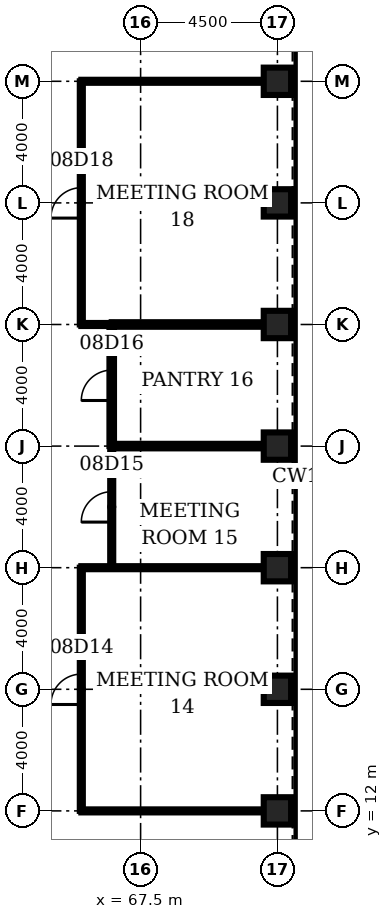
"""IFC4 building model, lengths in metres.
Left out: names, types, materials, properties, quantities, classifications, styles, units other than length and angle.
Written with IfcOpenShell. Run it as: python <this file> out.ifc"""

import sys

from ifc_helpers import new_model, si_unit, direction, frame, frame_2d, origin, origin_2d, place, context, subcontext, project, spatial, rectangle, hollow_rectangle, extrude, element, fill, save


model = new_model("IFC4")
c1 = context("Model", 3, precision=1e-05, world=origin(), true_north=direction((0.0, 1.0)))
c2 = subcontext(c1, "Body", "Model", "MODEL_VIEW")
j1 = project(units=[si_unit("LENGTHUNIT", "METRE"), si_unit("PLANEANGLEUNIT", "RADIAN")], contexts=[c1])
p1 = place(None, origin())
s1 = spatial("IfcSite", under=j1, at=p1, CompositionType="ELEMENT")
p2 = place(p1, origin())
s2 = spatial("IfcBuilding", under=s1, at=p2, CompositionType="ELEMENT")
p3 = place(p2, frame((0.0, 0.0, 41.0)))
s3 = spatial("IfcBuildingStorey", under=s2, at=p3, CompositionType="ELEMENT", Elevation=41.0)
for number, where, z_axis, x_axis in (
    (1, (72.0, 12.0, 0.0), (0.0, 0.0, 1.0), (1.0, 0.0, 0.0)),
    (2, (72.0, 16.0, 0.0), (0.0, 0.0, 1.0), (1.0, 0.0, 0.0)),
    (3, (72.0, 20.0, 0.0), (0.0, 0.0, 1.0), (1.0, 0.0, 0.0)),
    (4, (72.0, 24.0, 0.0), (0.0, 0.0, 1.0), (1.0, 0.0, 0.0)),
    (5, (72.0, 28.0, 0.0), (0.0, 0.0, 1.0), (1.0, 0.0, 0.0)),
    (6, (72.0, 32.0, 0.0), (0.0, 0.0, 1.0), (1.0, 0.0, 0.0)),
    (7, (72.0, 36.0, 0.0), (0.0, 0.0, 1.0), (1.0, 0.0, 0.0)),
):
    element("IfcColumn", number, at=place(p3, frame(where, z_axis=z_axis, x_axis=x_axis)), inside=s3, PredefinedType="COLUMN", context=c2, shape_type="SweptSolid", body=[
        extrude(hollow_rectangle(XDim=0.9, YDim=0.9, WallThickness=0.12, at=origin_2d()), origin(), (0.0, 0.0, 1.0), 4.5),
    ])
for number, where, z_axis, x_axis in (
    (8, (65.55, 12.0, 0.0), (0.0, 0.0, 1.0), (1.0, 0.0, 0.0)),
    (9, (65.55, 20.0, 0.0), (0.0, 0.0, 1.0), (1.0, 0.0, 0.0)),
):
    element("IfcWall", number, at=place(p3, frame(where, z_axis=z_axis, x_axis=x_axis)), inside=s3, PredefinedType="PARTITIONING", context=c2, shape_type="SweptSolid", body=[
        extrude(rectangle(XDim=6.0, YDim=0.1, at=frame_2d((3.0, 0.0))), origin(), (0.0, 0.0, 1.0), 3.0),
    ])
p4 = place(p3, frame((66.55, 24.0, 0.0), z_axis=(0.0, 0.0, 1.0), x_axis=(1.0, 0.0, 0.0)))
e10 = element("IfcWall", 10, at=p4, inside=s3, PredefinedType="PARTITIONING", context=c2, shape_type="SweptSolid", body=[
    extrude(rectangle(XDim=5.0, YDim=0.15, at=frame_2d((2.5, 0.0))), origin(), (0.0, 0.0, 1.0), 3.0),
])
p5 = place(p3, frame((65.55, 28.0, 0.0), z_axis=(0.0, 0.0, 1.0), x_axis=(1.0, 0.0, 0.0)))
e11 = element("IfcWall", 11, at=p5, inside=s3, PredefinedType="PARTITIONING", context=c2, shape_type="SweptSolid", body=[
    extrude(rectangle(XDim=1.0, YDim=0.1, at=frame_2d((0.5, 0.0))), origin(), (0.0, 0.0, 1.0), 3.0),
])
p6 = place(p3, frame((66.55, 28.0, 0.0), z_axis=(0.0, 0.0, 1.0), x_axis=(1.0, 0.0, 0.0)))
e12 = element("IfcWall", 12, at=p6, inside=s3, PredefinedType="PARTITIONING", context=c2, shape_type="SweptSolid", body=[
    extrude(rectangle(XDim=5.0, YDim=0.15, at=frame_2d((2.5, 0.0))), origin(), (0.0, 0.0, 1.0), 3.0),
])
p7 = place(p3, frame((65.55, 36.0, 0.0), z_axis=(0.0, 0.0, 1.0), x_axis=(1.0, 0.0, 0.0)))
e13 = element("IfcWall", 13, at=p7, inside=s3, PredefinedType="PARTITIONING", context=c2, shape_type="SweptSolid", body=[
    extrude(rectangle(XDim=6.0, YDim=0.1, at=frame_2d((3.0, 0.0))), origin(), (0.0, 0.0, 1.0), 3.0),
])
p8 = place(p3, frame((65.55, 12.0, 0.0), z_axis=(0.0, 0.0, 1.0), x_axis=(0.0, 1.0, 0.0)))
e14 = element("IfcWall", 14, at=p8, inside=s3, PredefinedType="PARTITIONING", context=c2, shape_type="SweptSolid", body=[
    extrude(rectangle(XDim=8.0, YDim=0.1, at=frame_2d((4.0, 0.0))), origin(), (0.0, 0.0, 1.0), 3.0),
])
p9 = place(p8, frame((3.5, 0.0, 0.0)))
e15 = element("IfcOpeningElement", 15, at=p9, cuts=e14, PredefinedType="OPENING", context=c2, shape_type="SweptSolid", body=[
    extrude(rectangle(XDim=1.0, YDim=2.1, at=frame_2d((0.5, 1.05))), frame((0.0, 0.06, 0.0), z_axis=(0.0, -1.0, 0.0), x_axis=(1.0, 0.0, 0.0)), (0.0, 0.0, 1.0), 0.12),
])
p10 = place(p3, frame((65.55, 28.0, 0.0), z_axis=(0.0, 0.0, 1.0), x_axis=(0.0, 1.0, 0.0)))
e16 = element("IfcWall", 16, at=p10, inside=s3, PredefinedType="PARTITIONING", context=c2, shape_type="SweptSolid", body=[
    extrude(rectangle(XDim=8.0, YDim=0.1, at=frame_2d((4.0, 0.0))), origin(), (0.0, 0.0, 1.0), 3.0),
])
p11 = place(p10, frame((3.5, 0.0, 0.0)))
e17 = element("IfcOpeningElement", 17, at=p11, cuts=e16, PredefinedType="OPENING", context=c2, shape_type="SweptSolid", body=[
    extrude(rectangle(XDim=1.0, YDim=2.1, at=frame_2d((0.5, 1.05))), frame((0.0, 0.06, 0.0), z_axis=(0.0, -1.0, 0.0), x_axis=(1.0, 0.0, 0.0)), (0.0, 0.0, 1.0), 0.12),
])
p12 = place(p3, frame((66.55, 20.0, 0.0), z_axis=(0.0, 0.0, 1.0), x_axis=(0.0, 1.0, 0.0)))
e18 = element("IfcWall", 18, at=p12, inside=s3, PredefinedType="PARTITIONING", context=c2, shape_type="SweptSolid", body=[
    extrude(rectangle(XDim=4.0, YDim=0.1, at=frame_2d((2.0, 0.0))), origin(), (0.0, 0.0, 1.0), 3.0),
])
p13 = place(p12, frame((1.5, 0.0, 0.0)))
e19 = element("IfcOpeningElement", 19, at=p13, cuts=e18, PredefinedType="OPENING", context=c2, shape_type="SweptSolid", body=[
    extrude(rectangle(XDim=1.0, YDim=2.1, at=frame_2d((0.5, 1.05))), frame((0.0, 0.06, 0.0), z_axis=(0.0, -1.0, 0.0), x_axis=(1.0, 0.0, 0.0)), (0.0, 0.0, 1.0), 0.12),
])
p14 = place(p3, frame((66.55, 24.0, 0.0), z_axis=(0.0, 0.0, 1.0), x_axis=(0.0, 1.0, 0.0)))
e20 = element("IfcWall", 20, at=p14, inside=s3, PredefinedType="PARTITIONING", context=c2, shape_type="SweptSolid", body=[
    extrude(rectangle(XDim=4.0, YDim=0.15, at=frame_2d((2.0, 0.0))), origin(), (0.0, 0.0, 1.0), 3.0),
])
p15 = place(p14, frame((1.5, 0.0, 0.0)))
e21 = element("IfcOpeningElement", 21, at=p15, cuts=e20, PredefinedType="OPENING", context=c2, shape_type="SweptSolid", body=[
    extrude(rectangle(XDim=1.0, YDim=2.1, at=frame_2d((0.5, 1.05))), frame((0.0, 0.085, 0.0), z_axis=(0.0, -1.0, 0.0), x_axis=(1.0, 0.0, 0.0)), (0.0, 0.0, 1.0), 0.17),
])
p16 = place(p9, origin())
e22 = element("IfcDoor", 22, at=p16, inside=s3, OperationType="SINGLE_SWING_LEFT", PredefinedType="DOOR", context=c2, shape_type="SweptSolid", body=[
    extrude(rectangle(XDim=1.0, YDim=2.1, at=frame_2d((0.5, 1.05))), frame((0.0, 0.025, 0.0), z_axis=(0.0, -1.0, 0.0), x_axis=(1.0, 0.0, 0.0)), (0.0, 0.0, 1.0), 0.05),
])
fill(e15, e22)
p17 = place(p13, origin())
e23 = element("IfcDoor", 23, at=p17, inside=s3, OperationType="SINGLE_SWING_LEFT", PredefinedType="DOOR", context=c2, shape_type="SweptSolid", body=[
    extrude(rectangle(XDim=1.0, YDim=2.1, at=frame_2d((0.5, 1.05))), frame((0.0, 0.025, 0.0), z_axis=(0.0, -1.0, 0.0), x_axis=(1.0, 0.0, 0.0)), (0.0, 0.0, 1.0), 0.05),
])
fill(e19, e23)
p18 = place(p15, origin())
e24 = element("IfcDoor", 24, at=p18, inside=s3, OperationType="SINGLE_SWING_LEFT", PredefinedType="DOOR", context=c2, shape_type="SweptSolid", body=[
    extrude(rectangle(XDim=1.0, YDim=2.1, at=frame_2d((0.5, 1.05))), frame((0.0, 0.025, 0.0), z_axis=(0.0, -1.0, 0.0), x_axis=(1.0, 0.0, 0.0)), (0.0, 0.0, 1.0), 0.05),
])
fill(e21, e24)
p19 = place(p11, origin())
e25 = element("IfcDoor", 25, at=p19, inside=s3, OperationType="SINGLE_SWING_LEFT", PredefinedType="DOOR", context=c2, shape_type="SweptSolid", body=[
    extrude(rectangle(XDim=1.0, YDim=2.1, at=frame_2d((0.5, 1.05))), frame((0.0, 0.025, 0.0), z_axis=(0.0, -1.0, 0.0), x_axis=(1.0, 0.0, 0.0)), (0.0, 0.0, 1.0), 0.05),
])
fill(e17, e25)
save(model, sys.argv[1])
